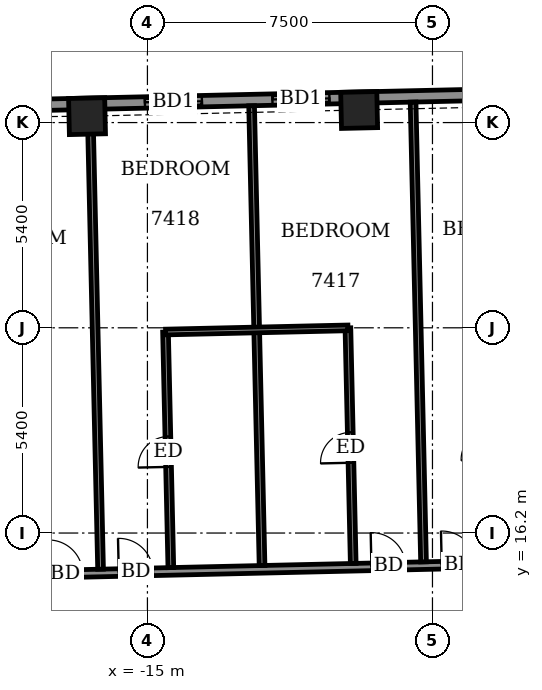
"""IFC4 building model, lengths in metres.
Left out: names, types, materials, properties, quantities, classifications, styles, units other than length and angle.
Written with IfcOpenShell. Run it as: python <this file> out.ifc"""

import sys

from ifc_helpers import new_model, si_unit, direction, frame, frame_2d, origin, origin_2d, place, context, subcontext, project, spatial, rectangle, extrude, element, fill, save


model = new_model("IFC4")
c1 = context("Model", 3, precision=1e-05, world=origin(), true_north=direction((0.0, 1.0)))
c2 = subcontext(c1, "Body", "Model", "MODEL_VIEW")
j1 = project(units=[si_unit("LENGTHUNIT", "METRE"), si_unit("PLANEANGLEUNIT", "RADIAN")], contexts=[c1])
p1 = place(None, origin())
s1 = spatial("IfcSite", under=j1, at=p1, CompositionType="ELEMENT")
p2 = place(p1, origin())
s2 = spatial("IfcBuilding", under=s1, at=p2, CompositionType="ELEMENT")
p3 = place(p2, frame((0.0, 0.0, 290.7)))
s3 = spatial("IfcBuildingStorey", under=s2, at=p3, CompositionType="ELEMENT", Elevation=290.7)
for number, where, z_axis, x_axis in (
    (1, (-9.429, 27.331, -0.55), (0.0, 0.0, 1.0), (-1.0, -0.023, 0.0)),
    (2, (-16.589, 27.169, -0.55), (0.0, 0.0, 1.0), (-1.0, -0.023, 0.0)),
):
    element("IfcColumn", number, at=place(p3, frame(where, z_axis=z_axis, x_axis=x_axis)), inside=s3, PredefinedType="COLUMN", context=c2, shape_type="SweptSolid", body=[
        extrude(rectangle(XDim=0.95, YDim=0.95, at=origin_2d()), origin(), (0.0, 0.0, 1.0), 3.6),
    ])
p4 = place(p3, frame((26.216, 28.465, 0.0), z_axis=(0.0, 0.0, 1.0), x_axis=(-0.999742843677, -0.022677004157, 0.0)))
e3 = element("IfcWall", 3, at=p4, inside=s3, PredefinedType="SOLIDWALL", context=c2, shape_type="SweptSolid", body=[
    extrude(rectangle(XDim=49.836, YDim=0.3, at=frame_2d((24.918, 0.0))), origin(), (0.0, 0.0, 1.0), 2.5),
])
p5 = place(p4, frame((1.763, 0.0, 0.0)))
e4 = element("IfcOpeningElement", 4, at=p5, cuts=e3, PredefinedType="OPENING", context=c2, shape_type="SweptSolid", body=[
    extrude(rectangle(XDim=1.5, YDim=2.4, at=frame_2d((0.75, 1.2))), frame((0.0, 0.16, 0.0), z_axis=(0.0, -1.0, 0.0), x_axis=(1.0, 0.0, 0.0)), (0.0, 0.0, 1.0), 0.32),
])
p6 = place(p4, frame((4.912, 0.0, 0.0)))
e5 = element("IfcOpeningElement", 5, at=p6, cuts=e3, PredefinedType="OPENING", context=c2, shape_type="SweptSolid", body=[
    extrude(rectangle(XDim=1.5, YDim=2.4, at=frame_2d((0.75, 1.2))), frame((0.0, 0.16, 0.0), z_axis=(0.0, -1.0, 0.0), x_axis=(1.0, 0.0, 0.0)), (0.0, 0.0, 1.0), 0.32),
])
p7 = place(p4, frame((10.186, 0.0, 0.0)))
e6 = element("IfcOpeningElement", 6, at=p7, cuts=e3, PredefinedType="OPENING", context=c2, shape_type="SweptSolid", body=[
    extrude(rectangle(XDim=1.5, YDim=2.4, at=frame_2d((0.75, 1.2))), frame((0.0, 0.16, 0.0), z_axis=(0.0, -1.0, 0.0), x_axis=(1.0, 0.0, 0.0)), (0.0, 0.0, 1.0), 0.32),
])
p8 = place(p4, frame((15.093, 0.0, 0.0)))
e7 = element("IfcOpeningElement", 7, at=p8, cuts=e3, PredefinedType="OPENING", context=c2, shape_type="SweptSolid", body=[
    extrude(rectangle(XDim=1.5, YDim=2.4, at=frame_2d((0.75, 1.2))), frame((0.0, 0.16, 0.0), z_axis=(0.0, -1.0, 0.0), x_axis=(1.0, 0.0, 0.0)), (0.0, 0.0, 1.0), 0.32),
])
p9 = place(p4, frame((18.449, 0.0, 0.0)))
e8 = element("IfcOpeningElement", 8, at=p9, cuts=e3, PredefinedType="OPENING", context=c2, shape_type="SweptSolid", body=[
    extrude(rectangle(XDim=1.5, YDim=2.4, at=frame_2d((0.75, 1.2))), frame((0.0, 0.16, 0.0), z_axis=(0.0, -1.0, 0.0), x_axis=(1.0, 0.0, 0.0)), (0.0, 0.0, 1.0), 0.32),
])
p10 = place(p4, frame((22.924, 0.0, 0.0)))
e9 = element("IfcOpeningElement", 9, at=p10, cuts=e3, PredefinedType="OPENING", context=c2, shape_type="SweptSolid", body=[
    extrude(rectangle(XDim=1.5, YDim=2.4, at=frame_2d((0.75, 1.2))), frame((0.0, 0.16, 0.0), z_axis=(0.0, -1.0, 0.0), x_axis=(1.0, 0.0, 0.0)), (0.0, 0.0, 1.0), 0.32),
])
p11 = place(p4, frame((26.28, 0.0, 0.0)))
e10 = element("IfcOpeningElement", 10, at=p11, cuts=e3, PredefinedType="OPENING", context=c2, shape_type="SweptSolid", body=[
    extrude(rectangle(XDim=1.5, YDim=2.4, at=frame_2d((0.75, 1.2))), frame((0.0, 0.16, 0.0), z_axis=(0.0, -1.0, 0.0), x_axis=(1.0, 0.0, 0.0)), (0.0, 0.0, 1.0), 0.32),
])
p12 = place(p4, frame((31.361, 0.0, 0.0)))
e11 = element("IfcOpeningElement", 11, at=p12, cuts=e3, PredefinedType="OPENING", context=c2, shape_type="SweptSolid", body=[
    extrude(rectangle(XDim=1.5, YDim=2.4, at=frame_2d((0.75, 1.2))), frame((0.0, 0.16, 0.0), z_axis=(0.0, -1.0, 0.0), x_axis=(1.0, 0.0, 0.0)), (0.0, 0.0, 1.0), 0.32),
])
p13 = place(p4, frame((36.437, 0.0, 0.0)))
e12 = element("IfcOpeningElement", 12, at=p13, cuts=e3, PredefinedType="OPENING", context=c2, shape_type="SweptSolid", body=[
    extrude(rectangle(XDim=1.5, YDim=2.4, at=frame_2d((0.75, 1.2))), frame((0.0, 0.16, 0.0), z_axis=(0.0, -1.0, 0.0), x_axis=(1.0, 0.0, 0.0)), (0.0, 0.0, 1.0), 0.32),
])
p14 = place(p4, frame((39.793, 0.0, 0.0)))
e13 = element("IfcOpeningElement", 13, at=p14, cuts=e3, PredefinedType="OPENING", context=c2, shape_type="SweptSolid", body=[
    extrude(rectangle(XDim=1.5, YDim=2.4, at=frame_2d((0.75, 1.2))), frame((0.0, 0.16, 0.0), z_axis=(0.0, -1.0, 0.0), x_axis=(1.0, 0.0, 0.0)), (0.0, 0.0, 1.0), 0.32),
])
p15 = place(p4, frame((44.267, 0.0, 0.0)))
e14 = element("IfcOpeningElement", 14, at=p15, cuts=e3, PredefinedType="OPENING", context=c2, shape_type="SweptSolid", body=[
    extrude(rectangle(XDim=1.5, YDim=2.4, at=frame_2d((0.75, 1.2))), frame((0.0, 0.16, 0.0), z_axis=(0.0, -1.0, 0.0), x_axis=(1.0, 0.0, 0.0)), (0.0, 0.0, 1.0), 0.32),
])
p16 = place(p4, frame((47.524, 0.0, 0.9)))
e15 = element("IfcOpeningElement", 15, at=p16, cuts=e3, PredefinedType="OPENING", context=c2, shape_type="SweptSolid", body=[
    extrude(rectangle(XDim=1.2, YDim=1.5, at=frame_2d((0.6, 0.75))), frame((0.0, 0.16, 0.0), z_axis=(0.0, -1.0, 0.0), x_axis=(1.0, 0.0, 0.0)), (0.0, 0.0, 1.0), 0.32),
])
p17 = place(p3, frame((-26.401, 14.918, 0.0), z_axis=(0.0, 0.0, 1.0), x_axis=(0.99974239733, 0.022696673341, 0.0)))
e16 = element("IfcWall", 16, at=p17, inside=s3, PredefinedType="PARTITIONING", context=c2, shape_type="SweptSolid", body=[
    extrude(rectangle(XDim=55.386, YDim=0.2, at=frame_2d((27.693, 0.0))), origin(), (0.0, 0.0, 1.0), 3.05),
])
p18 = place(p17, frame((53.718, 0.0, 0.0)))
e17 = element("IfcOpeningElement", 17, at=p18, cuts=e16, PredefinedType="OPENING", context=c2, shape_type="SweptSolid", body=[
    extrude(rectangle(XDim=1.0, YDim=2.1, at=frame_2d((0.5, 1.05))), frame((0.0, 0.11, 0.0), z_axis=(0.0, -1.0, 0.0), x_axis=(1.0, 0.0, 0.0)), (0.0, 0.0, 1.0), 0.22),
])
p19 = place(p17, frame((49.325, 0.0, 0.0)))
e18 = element("IfcOpeningElement", 18, at=p19, cuts=e16, PredefinedType="OPENING", context=c2, shape_type="SweptSolid", body=[
    extrude(rectangle(XDim=0.9, YDim=2.1, at=frame_2d((0.45, 1.05))), frame((0.0, 0.11, 0.0), z_axis=(0.0, -1.0, 0.0), x_axis=(1.0, 0.0, 0.0)), (0.0, 0.0, 1.0), 0.22),
])
p20 = place(p17, frame((44.575, 0.0, 0.0)))
e19 = element("IfcOpeningElement", 19, at=p20, cuts=e16, PredefinedType="OPENING", context=c2, shape_type="SweptSolid", body=[
    extrude(rectangle(XDim=0.9, YDim=2.1, at=frame_2d((0.45, 1.05))), frame((0.0, 0.11, 0.0), z_axis=(0.0, -1.0, 0.0), x_axis=(1.0, 0.0, 0.0)), (0.0, 0.0, 1.0), 0.22),
])
p21 = place(p17, frame((42.725, 0.0, 0.0)))
e20 = element("IfcOpeningElement", 20, at=p21, cuts=e16, PredefinedType="OPENING", context=c2, shape_type="SweptSolid", body=[
    extrude(rectangle(XDim=0.9, YDim=2.1, at=frame_2d((0.45, 1.05))), frame((0.0, 0.11, 0.0), z_axis=(0.0, -1.0, 0.0), x_axis=(1.0, 0.0, 0.0)), (0.0, 0.0, 1.0), 0.22),
])
p22 = place(p17, frame((36.1, 0.0, 0.0)))
e21 = element("IfcOpeningElement", 21, at=p22, cuts=e16, PredefinedType="OPENING", context=c2, shape_type="SweptSolid", body=[
    extrude(rectangle(XDim=0.9, YDim=2.1, at=frame_2d((0.45, 1.05))), frame((0.0, 0.11, 0.0), z_axis=(0.0, -1.0, 0.0), x_axis=(1.0, 0.0, 0.0)), (0.0, 0.0, 1.0), 0.22),
])
p23 = place(p17, frame((34.25, 0.0, 0.0)))
e22 = element("IfcOpeningElement", 22, at=p23, cuts=e16, PredefinedType="OPENING", context=c2, shape_type="SweptSolid", body=[
    extrude(rectangle(XDim=0.9, YDim=2.1, at=frame_2d((0.45, 1.05))), frame((0.0, 0.11, 0.0), z_axis=(0.0, -1.0, 0.0), x_axis=(1.0, 0.0, 0.0)), (0.0, 0.0, 1.0), 0.22),
])
p24 = place(p17, frame((27.6, 0.0, 0.0)))
e23 = element("IfcOpeningElement", 23, at=p24, cuts=e16, PredefinedType="OPENING", context=c2, shape_type="SweptSolid", body=[
    extrude(rectangle(XDim=0.9, YDim=2.1, at=frame_2d((0.45, 1.05))), frame((0.0, 0.11, 0.0), z_axis=(0.0, -1.0, 0.0), x_axis=(1.0, 0.0, 0.0)), (0.0, 0.0, 1.0), 0.22),
])
p25 = place(p17, frame((25.775, 0.0, 0.0)))
e24 = element("IfcOpeningElement", 24, at=p25, cuts=e16, PredefinedType="OPENING", context=c2, shape_type="SweptSolid", body=[
    extrude(rectangle(XDim=0.9, YDim=2.1, at=frame_2d((0.45, 1.05))), frame((0.0, 0.11, 0.0), z_axis=(0.0, -1.0, 0.0), x_axis=(1.0, 0.0, 0.0)), (0.0, 0.0, 1.0), 0.22),
])
p26 = place(p17, frame((19.15, 0.0, 0.0)))
e25 = element("IfcOpeningElement", 25, at=p26, cuts=e16, PredefinedType="OPENING", context=c2, shape_type="SweptSolid", body=[
    extrude(rectangle(XDim=0.9, YDim=2.1, at=frame_2d((0.45, 1.05))), frame((0.0, 0.11, 0.0), z_axis=(0.0, -1.0, 0.0), x_axis=(1.0, 0.0, 0.0)), (0.0, 0.0, 1.0), 0.22),
])
p27 = place(p17, frame((17.3, 0.0, 0.0)))
e26 = element("IfcOpeningElement", 26, at=p27, cuts=e16, PredefinedType="OPENING", context=c2, shape_type="SweptSolid", body=[
    extrude(rectangle(XDim=0.9, YDim=2.1, at=frame_2d((0.45, 1.05))), frame((0.0, 0.11, 0.0), z_axis=(0.0, -1.0, 0.0), x_axis=(1.0, 0.0, 0.0)), (0.0, 0.0, 1.0), 0.22),
])
p28 = place(p17, frame((10.65, 0.0, 0.0)))
e27 = element("IfcOpeningElement", 27, at=p28, cuts=e16, PredefinedType="OPENING", context=c2, shape_type="SweptSolid", body=[
    extrude(rectangle(XDim=0.9, YDim=2.1, at=frame_2d((0.45, 1.05))), frame((0.0, 0.11, 0.0), z_axis=(0.0, -1.0, 0.0), x_axis=(1.0, 0.0, 0.0)), (0.0, 0.0, 1.0), 0.22),
])
p29 = place(p17, frame((8.8, 0.0, 0.0)))
e28 = element("IfcOpeningElement", 28, at=p29, cuts=e16, PredefinedType="OPENING", context=c2, shape_type="SweptSolid", body=[
    extrude(rectangle(XDim=0.9, YDim=2.1, at=frame_2d((0.45, 1.05))), frame((0.0, 0.11, 0.0), z_axis=(0.0, -1.0, 0.0), x_axis=(1.0, 0.0, 0.0)), (0.0, 0.0, 1.0), 0.22),
])
p30 = place(p17, frame((1.864, 0.0, 0.0)))
e29 = element("IfcOpeningElement", 29, at=p30, cuts=e16, PredefinedType="OPENING", context=c2, shape_type="SweptSolid", body=[
    extrude(rectangle(XDim=1.0, YDim=2.1, at=frame_2d((0.5, 1.05))), frame((0.0, 0.11, 0.0), z_axis=(0.0, -1.0, 0.0), x_axis=(1.0, 0.0, 0.0)), (0.0, 0.0, 1.0), 0.22),
])
p31 = place(p3, frame((-16.233, 15.249, 0.0), z_axis=(0.0, 0.0, 1.0), x_axis=(-0.02273928012, 0.99974142914, 0.0)))
e30 = element("IfcWall", 30, at=p31, inside=s3, PredefinedType="PARTITIONING", context=c2, shape_type="SweptSolid", body=[
    extrude(rectangle(XDim=12.1, YDim=0.15, at=frame_2d((6.05, 0.0))), origin(), (0.0, 0.0, 1.0), 3.05),
])
p32 = place(p3, frame((-14.384, 15.291, 0.0), z_axis=(0.0, 0.0, 1.0), x_axis=(-0.022564860101, 0.999745381129, 0.0)))
e31 = element("IfcWall", 31, at=p32, inside=s3, PredefinedType="PARTITIONING", context=c2, shape_type="SweptSolid", body=[
    extrude(rectangle(XDim=6.199, YDim=0.15, at=frame_2d((3.1, 0.0))), origin(), (0.0, 0.0, 1.0), 3.05),
])
p33 = place(p32, frame((2.65, 0.0, 0.0)))
e32 = element("IfcOpeningElement", 32, at=p33, cuts=e31, PredefinedType="OPENING", context=c2, shape_type="SweptSolid", body=[
    extrude(rectangle(XDim=0.8, YDim=2.1, at=frame_2d((0.4, 1.05))), frame((0.0, 0.085, 0.0), z_axis=(0.0, -1.0, 0.0), x_axis=(1.0, 0.0, 0.0)), (0.0, 0.0, 1.0), 0.17),
])
p34 = place(p3, frame((-11.984, 15.345, 0.0), z_axis=(0.0, 0.0, 1.0), x_axis=(-0.02273928012, 0.99974142914, 0.0)))
e33 = element("IfcWall", 33, at=p34, inside=s3, PredefinedType="PARTITIONING", context=c2, shape_type="SweptSolid", body=[
    extrude(rectangle(XDim=12.1, YDim=0.15, at=frame_2d((6.05, 0.0))), origin(), (0.0, 0.0, 1.0), 2.5),
])
p35 = place(p3, frame((-9.585, 15.4, 0.0), z_axis=(0.0, 0.0, 1.0), x_axis=(-0.022604220207, 0.999744491972, 0.0)))
e34 = element("IfcWall", 34, at=p35, inside=s3, PredefinedType="PARTITIONING", context=c2, shape_type="SweptSolid", body=[
    extrude(rectangle(XDim=6.199, YDim=0.15, at=frame_2d((3.1, 0.0))), origin(), (0.0, 0.0, 1.0), 3.05),
])
p36 = place(p35, frame((2.65, 0.0, 0.0)))
e35 = element("IfcOpeningElement", 35, at=p36, cuts=e34, PredefinedType="OPENING", context=c2, shape_type="SweptSolid", body=[
    extrude(rectangle(XDim=0.8, YDim=2.1, at=frame_2d((0.4, 1.05))), frame((0.0, 0.085, 0.0), z_axis=(0.0, -1.0, 0.0), x_axis=(1.0, 0.0, 0.0)), (0.0, 0.0, 1.0), 0.17),
])
p37 = place(p3, frame((-7.735, 15.442, 0.0), z_axis=(0.0, 0.0, 1.0), x_axis=(-0.022718655443, 0.999741898039, 0.0)))
e36 = element("IfcWall", 36, at=p37, inside=s3, PredefinedType="PARTITIONING", context=c2, shape_type="SweptSolid", body=[
    extrude(rectangle(XDim=12.1, YDim=0.15, at=frame_2d((6.05, 0.0))), origin(), (0.0, 0.0, 1.0), 2.5),
])
p38 = place(p3, frame((-14.522, 21.489, 0.0), z_axis=(0.0, 0.0, 1.0), x_axis=(0.999742701292, 0.022683280499, 0.0)))
e37 = element("IfcWall", 37, at=p38, inside=s3, PredefinedType="PARTITIONING", context=c2, shape_type="SweptSolid", body=[
    extrude(rectangle(XDim=4.8, YDim=0.15, at=frame_2d((2.4, 0.0))), origin(), (0.0, 0.0, 1.0), 3.05),
])
p39 = place(p13, origin())
e38 = element("IfcDoor", 38, at=p39, inside=s3, OperationType="SLIDING_TO_LEFT", PredefinedType="DOOR", context=c2, shape_type="SweptSolid", body=[
    extrude(rectangle(XDim=1.5, YDim=2.4, at=frame_2d((0.75, 1.2))), frame((0.0, 0.025, 0.0), z_axis=(0.0, -1.0, 0.0), x_axis=(1.0, 0.0, 0.0)), (0.0, 0.0, 1.0), 0.05),
])
fill(e12, e38)
p40 = place(p14, origin())
e39 = element("IfcDoor", 39, at=p40, inside=s3, OperationType="SLIDING_TO_LEFT", PredefinedType="DOOR", context=c2, shape_type="SweptSolid", body=[
    extrude(rectangle(XDim=1.5, YDim=2.4, at=frame_2d((0.75, 1.2))), frame((0.0, 0.025, 0.0), z_axis=(0.0, -1.0, 0.0), x_axis=(1.0, 0.0, 0.0)), (0.0, 0.0, 1.0), 0.05),
])
fill(e13, e39)
p41 = place(p26, origin())
e40 = element("IfcDoor", 40, at=p41, inside=s3, OperationType="SINGLE_SWING_RIGHT", PredefinedType="DOOR", context=c2, shape_type="SweptSolid", body=[
    extrude(rectangle(XDim=0.9, YDim=2.1, at=frame_2d((0.45, 1.05))), frame((0.0, 0.025, 0.0), z_axis=(0.0, -1.0, 0.0), x_axis=(1.0, 0.0, 0.0)), (0.0, 0.0, 1.0), 0.05),
])
fill(e25, e40)
p42 = place(p27, origin())
e41 = element("IfcDoor", 41, at=p42, inside=s3, OperationType="SINGLE_SWING_LEFT", PredefinedType="DOOR", context=c2, shape_type="SweptSolid", body=[
    extrude(rectangle(XDim=0.9, YDim=2.1, at=frame_2d((0.45, 1.05))), frame((0.0, 0.025, 0.0), z_axis=(0.0, -1.0, 0.0), x_axis=(1.0, 0.0, 0.0)), (0.0, 0.0, 1.0), 0.05),
])
fill(e26, e41)
p43 = place(p36, origin())
e42 = element("IfcDoor", 42, at=p43, inside=s3, OperationType="SINGLE_SWING_LEFT", PredefinedType="DOOR", context=c2, shape_type="SweptSolid", body=[
    extrude(rectangle(XDim=0.8, YDim=2.1, at=frame_2d((0.4, 1.05))), frame((0.0, 0.025, 0.0), z_axis=(0.0, -1.0, 0.0), x_axis=(1.0, 0.0, 0.0)), (0.0, 0.0, 1.0), 0.05),
])
fill(e35, e42)
p44 = place(p28, origin())
e43 = element("IfcDoor", 43, at=p44, inside=s3, OperationType="SINGLE_SWING_RIGHT", PredefinedType="DOOR", context=c2, shape_type="SweptSolid", body=[
    extrude(rectangle(XDim=0.9, YDim=2.1, at=frame_2d((0.45, 1.05))), frame((0.0, 0.025, 0.0), z_axis=(0.0, -1.0, 0.0), x_axis=(1.0, 0.0, 0.0)), (0.0, 0.0, 1.0), 0.05),
])
fill(e27, e43)
p45 = place(p33, origin())
e44 = element("IfcDoor", 44, at=p45, inside=s3, OperationType="SINGLE_SWING_RIGHT", PredefinedType="DOOR", context=c2, shape_type="SweptSolid", body=[
    extrude(rectangle(XDim=0.8, YDim=2.1, at=frame_2d((0.4, 1.05))), frame((0.0, 0.025, 0.0), z_axis=(0.0, -1.0, 0.0), x_axis=(1.0, 0.0, 0.0)), (0.0, 0.0, 1.0), 0.05),
])
fill(e32, e44)
p46 = place(p29, origin())
e45 = element("IfcDoor", 45, at=p46, inside=s3, OperationType="SINGLE_SWING_LEFT", PredefinedType="DOOR", context=c2, shape_type="SweptSolid", body=[
    extrude(rectangle(XDim=0.9, YDim=2.1, at=frame_2d((0.45, 1.05))), frame((0.0, 0.025, 0.0), z_axis=(0.0, -1.0, 0.0), x_axis=(1.0, 0.0, 0.0)), (0.0, 0.0, 1.0), 0.05),
])
fill(e28, e45)
save(model, sys.argv[1])
